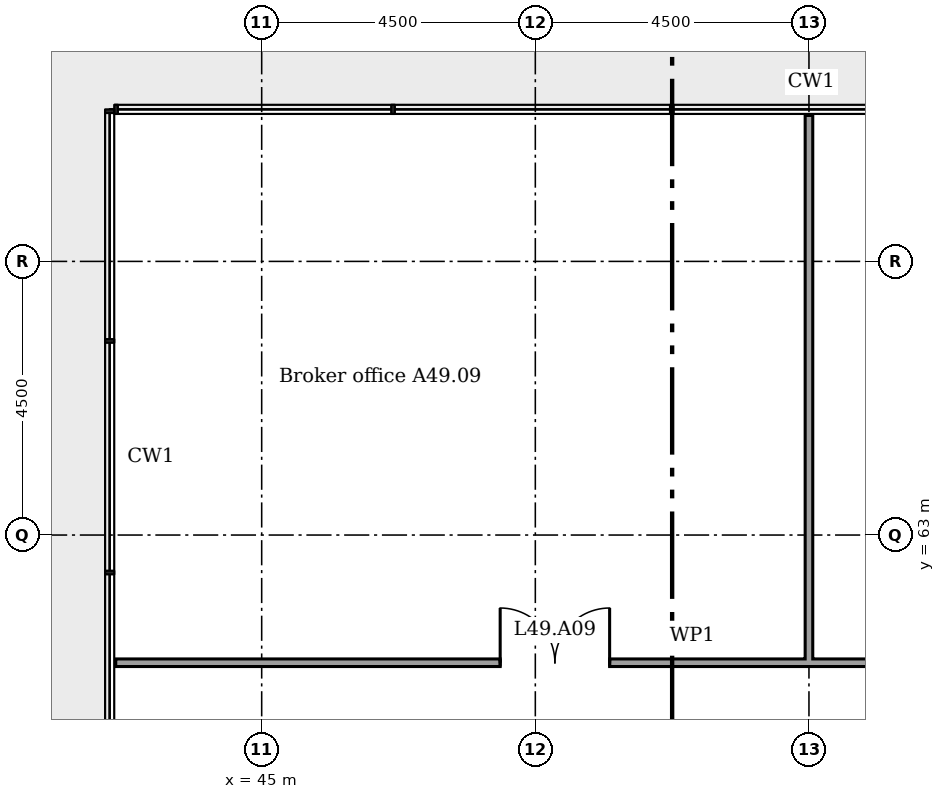
"""IFC4 building model, lengths in metres.
Left out: names, types, materials, properties, quantities, classifications, styles, units other than length and angle.
Written with IfcOpenShell. Run it as: python <this file> out.ifc"""

import sys

from ifc_helpers import new_model, si_unit, direction, frame, frame_2d, origin, place, context, subcontext, project, spatial, rectangle, extrude, element, fill, save


model = new_model("IFC4")
c1 = context("Model", 3, precision=1e-05, world=origin(), true_north=direction((0.0, 1.0)))
c2 = subcontext(c1, "Body", "Model", "MODEL_VIEW")
j1 = project(units=[si_unit("LENGTHUNIT", "METRE"), si_unit("PLANEANGLEUNIT", "RADIAN")], contexts=[c1])
p1 = place(None, origin())
s1 = spatial("IfcSite", under=j1, at=p1, CompositionType="ELEMENT")
p2 = place(p1, origin())
s2 = spatial("IfcBuilding", under=s1, at=p2, CompositionType="ELEMENT")
p3 = place(p2, frame((0.0, 0.0, 195.6)))
s3 = spatial("IfcBuildingStorey", under=s2, at=p3, CompositionType="ELEMENT", Elevation=195.6)
p4 = place(p3, frame((42.6, 60.9, 0.0)))
e1 = element("IfcWall", 1, at=p4, inside=s3, PredefinedType="PARTITIONING", context=c2, shape_type="SweptSolid", body=[
    extrude(rectangle(XDim=18.962, YDim=0.125, at=frame_2d((9.481, 0.0))), origin(), (0.0, 0.0, 1.0), 3.45),
])
p5 = place(p4, frame((12.695, 0.0, 0.0)))
e2 = element("IfcOpeningElement", 2, at=p5, cuts=e1, PredefinedType="OPENING", context=c2, shape_type="SweptSolid", body=[
    extrude(rectangle(XDim=1.0, YDim=2.1, at=frame_2d((0.5, 1.05))), frame((0.0, 0.073, 0.0), z_axis=(0.0, -1.0, 0.0), x_axis=(1.0, 0.0, 0.0)), (0.0, 0.0, 1.0), 0.145),
])
p6 = place(p4, frame((6.322, 0.0, 0.0)))
e3 = element("IfcOpeningElement", 3, at=p6, cuts=e1, PredefinedType="OPENING", context=c2, shape_type="SweptSolid", body=[
    extrude(rectangle(XDim=1.8, YDim=2.1, at=frame_2d((0.9, 1.05))), frame((0.0, 0.073, 0.0), z_axis=(0.0, -1.0, 0.0), x_axis=(1.0, 0.0, 0.0)), (0.0, 0.0, 1.0), 0.145),
])
p7 = place(p3, frame((54.0, 60.9, 0.0), z_axis=(0.0, 0.0, 1.0), x_axis=(0.0, 1.0, 0.0)))
e4 = element("IfcWall", 4, at=p7, inside=s3, PredefinedType="PARTITIONING", context=c2, shape_type="SweptSolid", body=[
    extrude(rectangle(XDim=9.0, YDim=0.125, at=frame_2d((4.5, 0.0))), origin(), (0.0, 0.0, 1.0), 2.772),
])
p8 = place(p6, origin())
e5 = element("IfcDoor", 5, at=p8, inside=s3, OperationType="DOUBLE_DOOR_SINGLE_SWING", PredefinedType="DOOR", context=c2, shape_type="SweptSolid", body=[
    extrude(rectangle(XDim=1.8, YDim=2.1, at=frame_2d((0.9, 1.05))), frame((0.0, 0.025, 0.0), z_axis=(0.0, -1.0, 0.0), x_axis=(1.0, 0.0, 0.0)), (0.0, 0.0, 1.0), 0.05),
])
fill(e3, e5)
save(model, sys.argv[1])
